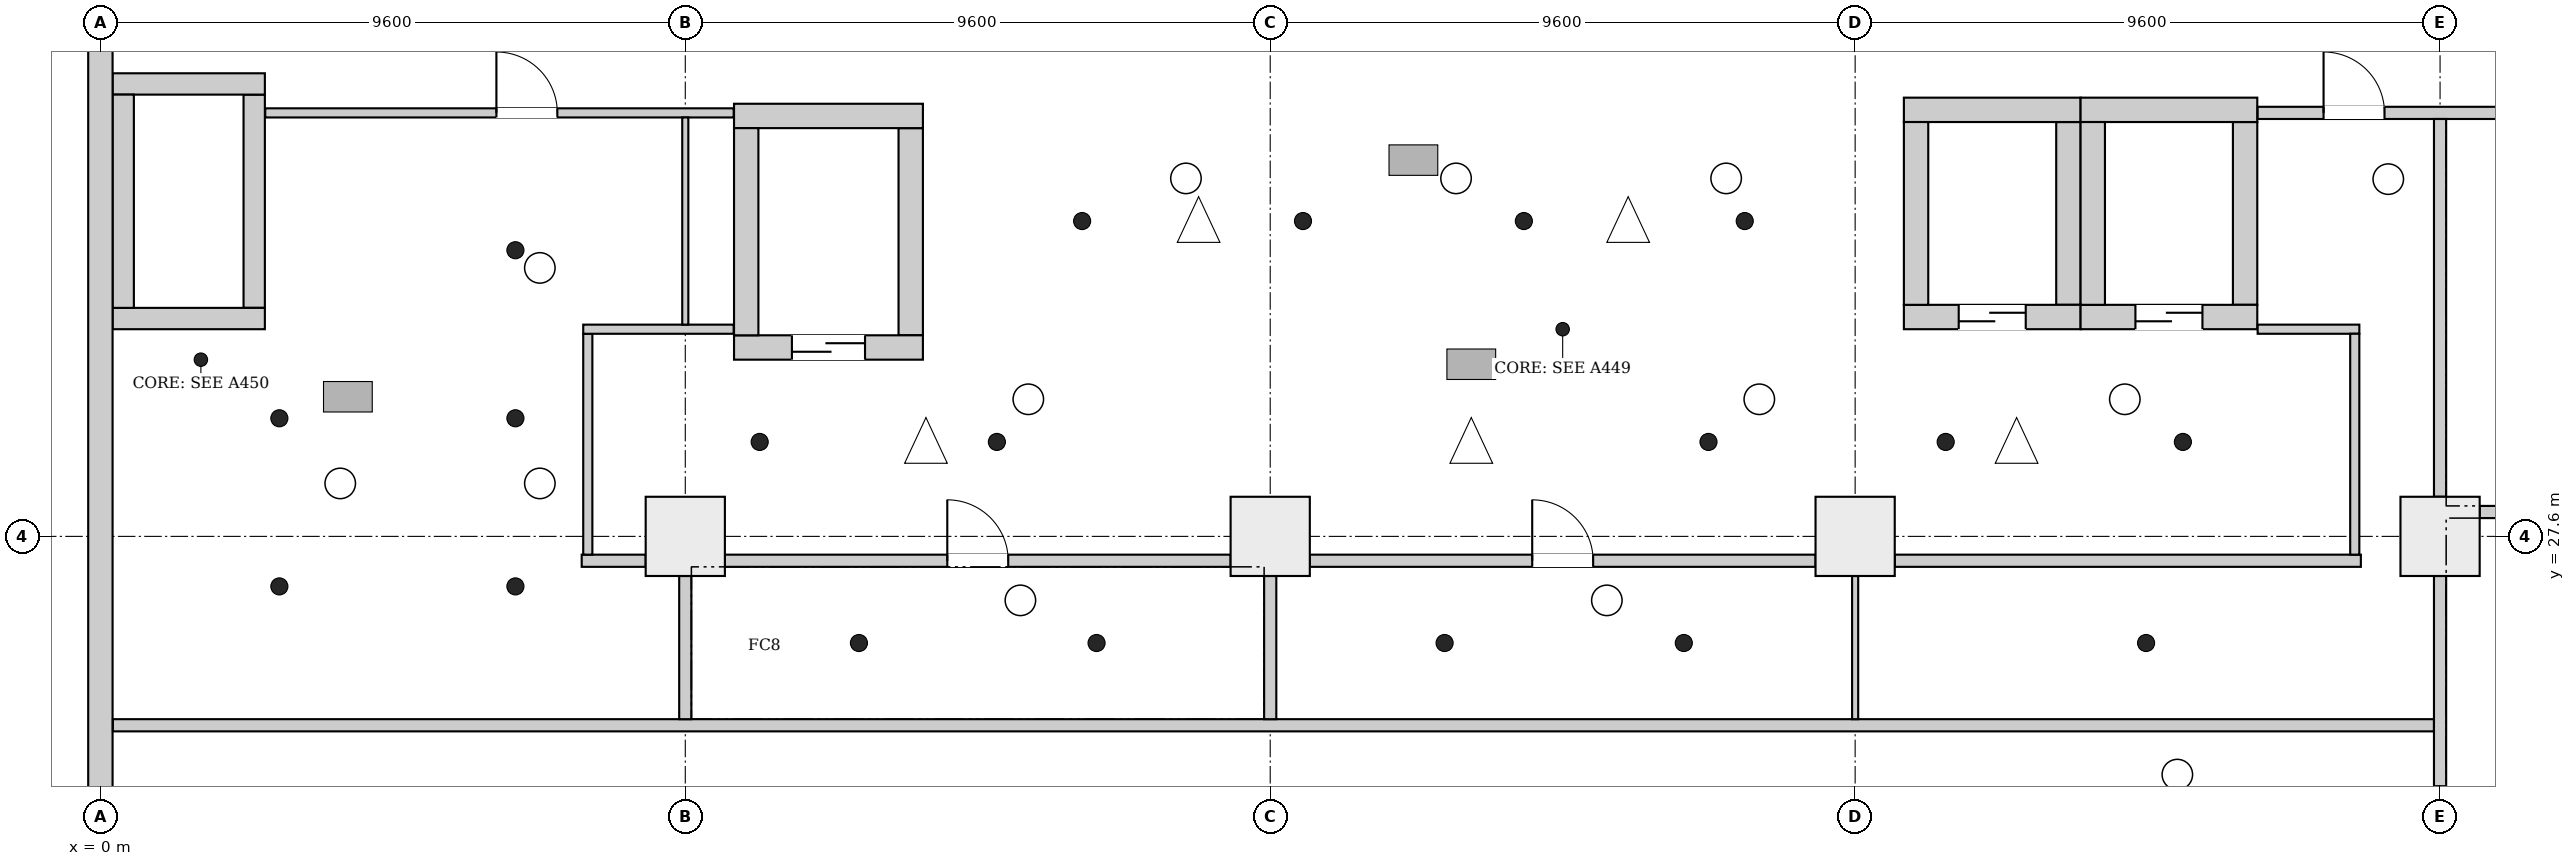
"""IFC4 building model, lengths in metres.
Left out: names, types, materials, properties, quantities, classifications, styles, units other than length and angle.
Written with IfcOpenShell. Run it as: python <this file> out.ifc"""

import sys

from ifc_helpers import new_model, si_unit, direction, frame, frame_2d, origin, origin_2d, place, context, subcontext, project, spatial, rectangle, extrude, element, fill, save


model = new_model("IFC4")
c1 = context("Model", 3, precision=1e-05, world=origin(), true_north=direction((0.0, 1.0)))
c2 = subcontext(c1, "Body", "Model", "MODEL_VIEW")
j1 = project(units=[si_unit("LENGTHUNIT", "METRE"), si_unit("PLANEANGLEUNIT", "RADIAN")], contexts=[c1])
p1 = place(None, origin())
s1 = spatial("IfcSite", under=j1, at=p1, CompositionType="ELEMENT")
p2 = place(p1, origin())
s2 = spatial("IfcBuilding", under=s1, at=p2, CompositionType="ELEMENT")
p3 = place(p2, frame((0.0, 0.0, 6.5)))
s3 = spatial("IfcBuildingStorey", under=s2, at=p3, CompositionType="ELEMENT", Elevation=6.5)
p4 = place(p3, frame((0.0, -0.2, 0.0), z_axis=(0.0, 0.0, 1.0), x_axis=(0.0, 1.0, 0.0)))
e1 = element("IfcWall", 1, at=p4, inside=s3, PredefinedType="SHEAR", context=c2, shape_type="SweptSolid", body=[
    extrude(rectangle(XDim=46.88, YDim=0.4, at=frame_2d((23.44, 0.0))), origin(), (0.0, 0.0, 1.0), 7.7),
])
for number, where, z_axis, x_axis in (
    (2, (0.2, 31.175, 0.0), (0.0, 0.0, 1.0), (1.0, 0.0, 0.0)),
    (3, (0.2, 35.025, 0.0), (0.0, 0.0, 1.0), (1.0, 0.0, 0.0)),
):
    element("IfcWall", number, at=place(p3, frame(where, z_axis=z_axis, x_axis=x_axis)), inside=s3, PredefinedType="SHEAR", context=c2, shape_type="SweptSolid", body=[
        extrude(rectangle(XDim=2.5, YDim=0.35, at=frame_2d((1.25, 0.0))), origin(), (0.0, 0.0, 1.0), 7.7),
    ])
for number, where, z_axis, x_axis in (
    (4, (0.375, 31.35, 0.0), (0.0, 0.0, 1.0), (0.0, 1.0, 0.0)),
    (5, (2.525, 31.35, 0.0), (0.0, 0.0, 1.0), (0.0, 1.0, 0.0)),
):
    element("IfcWall", number, at=place(p3, frame(where, z_axis=z_axis, x_axis=x_axis)), inside=s3, PredefinedType="SHEAR", context=c2, shape_type="SweptSolid", body=[
        extrude(rectangle(XDim=3.5, YDim=0.35, at=frame_2d((1.75, 0.0))), origin(), (0.0, 0.0, 1.0), 7.7),
    ])
p5 = place(p3, frame((10.4, 30.7, 0.0), z_axis=(0.0, 0.0, 1.0), x_axis=(1.0, 0.0, 0.0)))
e6 = element("IfcWall", 6, at=p5, inside=s3, PredefinedType="SHEAR", context=c2, shape_type="SweptSolid", body=[
    extrude(rectangle(XDim=3.1, YDim=0.4, at=frame_2d((1.55, 0.0))), origin(), (0.0, 0.0, 1.0), 7.7),
])
p6 = place(p5, frame((0.95, 0.0, 0.0)))
e7 = element("IfcOpeningElement", 7, at=p6, cuts=e6, PredefinedType="OPENING", context=c2, shape_type="SweptSolid", body=[
    extrude(rectangle(XDim=1.2, YDim=2.1, at=frame_2d((0.6, 1.05))), frame((0.0, 0.21, 0.0), z_axis=(0.0, -1.0, 0.0), x_axis=(1.0, 0.0, 0.0)), (0.0, 0.0, 1.0), 0.42),
])
p7 = place(p3, frame((10.4, 34.5, 0.0), z_axis=(0.0, 0.0, 1.0), x_axis=(1.0, 0.0, 0.0)))
e8 = element("IfcWall", 8, at=p7, inside=s3, PredefinedType="SHEAR", context=c2, shape_type="SweptSolid", body=[
    extrude(rectangle(XDim=3.1, YDim=0.4, at=frame_2d((1.55, 0.0))), origin(), (0.0, 0.0, 1.0), 7.7),
])
for number, where, z_axis, x_axis in (
    (9, (10.6, 30.9, 0.0), (0.0, 0.0, 1.0), (0.0, 1.0, 0.0)),
    (10, (13.3, 30.9, 0.0), (0.0, 0.0, 1.0), (0.0, 1.0, 0.0)),
):
    element("IfcWall", number, at=place(p3, frame(where, z_axis=z_axis, x_axis=x_axis)), inside=s3, PredefinedType="SHEAR", context=c2, shape_type="SweptSolid", body=[
        extrude(rectangle(XDim=3.4, YDim=0.4, at=frame_2d((1.7, 0.0))), origin(), (0.0, 0.0, 1.0), 7.7),
    ])
p8 = place(p3, frame((29.6, 31.2, 0.0), z_axis=(0.0, 0.0, 1.0), x_axis=(1.0, 0.0, 0.0)))
e11 = element("IfcWall", 11, at=p8, inside=s3, PredefinedType="SHEAR", context=c2, shape_type="SweptSolid", body=[
    extrude(rectangle(XDim=2.9, YDim=0.4, at=frame_2d((1.45, 0.0))), origin(), (0.0, 0.0, 1.0), 7.7),
])
p9 = place(p8, frame((0.9, 0.0, 0.0)))
e12 = element("IfcOpeningElement", 12, at=p9, cuts=e11, PredefinedType="OPENING", context=c2, shape_type="SweptSolid", body=[
    extrude(rectangle(XDim=1.1, YDim=2.1, at=frame_2d((0.55, 1.05))), frame((0.0, 0.21, 0.0), z_axis=(0.0, -1.0, 0.0), x_axis=(1.0, 0.0, 0.0)), (0.0, 0.0, 1.0), 0.42),
])
p10 = place(p3, frame((29.6, 34.6, 0.0), z_axis=(0.0, 0.0, 1.0), x_axis=(1.0, 0.0, 0.0)))
e13 = element("IfcWall", 13, at=p10, inside=s3, PredefinedType="SHEAR", context=c2, shape_type="SweptSolid", body=[
    extrude(rectangle(XDim=2.9, YDim=0.4, at=frame_2d((1.45, 0.0))), origin(), (0.0, 0.0, 1.0), 7.7),
])
for number, where, z_axis, x_axis in (
    (14, (29.8, 31.4, 0.0), (0.0, 0.0, 1.0), (0.0, 1.0, 0.0)),
    (15, (32.3, 31.4, 0.0), (0.0, 0.0, 1.0), (0.0, 1.0, 0.0)),
):
    element("IfcWall", number, at=place(p3, frame(where, z_axis=z_axis, x_axis=x_axis)), inside=s3, PredefinedType="SHEAR", context=c2, shape_type="SweptSolid", body=[
        extrude(rectangle(XDim=3.0, YDim=0.4, at=frame_2d((1.5, 0.0))), origin(), (0.0, 0.0, 1.0), 7.7),
    ])
p11 = place(p3, frame((32.5, 31.2, 0.0), z_axis=(0.0, 0.0, 1.0), x_axis=(1.0, 0.0, 0.0)))
e16 = element("IfcWall", 16, at=p11, inside=s3, PredefinedType="SHEAR", context=c2, shape_type="SweptSolid", body=[
    extrude(rectangle(XDim=2.9, YDim=0.4, at=frame_2d((1.45, 0.0))), origin(), (0.0, 0.0, 1.0), 7.7),
])
p12 = place(p11, frame((0.9, 0.0, 0.0)))
e17 = element("IfcOpeningElement", 17, at=p12, cuts=e16, PredefinedType="OPENING", context=c2, shape_type="SweptSolid", body=[
    extrude(rectangle(XDim=1.1, YDim=2.1, at=frame_2d((0.55, 1.05))), frame((0.0, 0.21, 0.0), z_axis=(0.0, -1.0, 0.0), x_axis=(1.0, 0.0, 0.0)), (0.0, 0.0, 1.0), 0.42),
])
p13 = place(p3, frame((32.5, 34.6, 0.0), z_axis=(0.0, 0.0, 1.0), x_axis=(1.0, 0.0, 0.0)))
e18 = element("IfcWall", 18, at=p13, inside=s3, PredefinedType="SHEAR", context=c2, shape_type="SweptSolid", body=[
    extrude(rectangle(XDim=2.9, YDim=0.4, at=frame_2d((1.45, 0.0))), origin(), (0.0, 0.0, 1.0), 7.7),
])
for number, where, z_axis, x_axis in (
    (19, (32.7, 31.4, 0.0), (0.0, 0.0, 1.0), (0.0, 1.0, 0.0)),
    (20, (35.2, 31.4, 0.0), (0.0, 0.0, 1.0), (0.0, 1.0, 0.0)),
):
    element("IfcWall", number, at=place(p3, frame(where, z_axis=z_axis, x_axis=x_axis)), inside=s3, PredefinedType="SHEAR", context=c2, shape_type="SweptSolid", body=[
        extrude(rectangle(XDim=3.0, YDim=0.4, at=frame_2d((1.5, 0.0))), origin(), (0.0, 0.0, 1.0), 7.7),
    ])
for number, where, z_axis, x_axis in (
    (21, (9.6, 27.6, 0.0), (0.0, 0.0, 1.0), (1.0, 0.0, 0.0)),
    (22, (19.2, 27.6, 0.0), (0.0, 0.0, 1.0), (1.0, 0.0, 0.0)),
    (23, (28.8, 27.6, 0.0), (0.0, 0.0, 1.0), (1.0, 0.0, 0.0)),
    (24, (38.4, 27.6, 0.0), (0.0, 0.0, 1.0), (1.0, 0.0, 0.0)),
):
    element("IfcColumn", number, at=place(p3, frame(where, z_axis=z_axis, x_axis=x_axis)), inside=s3, PredefinedType="COLUMN", context=c2, shape_type="SweptSolid", body=[
        extrude(rectangle(XDim=1.3, YDim=1.3, at=origin_2d()), origin(), (0.0, 0.0, 1.0), 7.7),
    ])
p14 = place(p3, frame((0.206, 24.5, 0.0), z_axis=(0.0, 0.0, 1.0), x_axis=(1.0, 0.0, 0.0)))
e25 = element("IfcWall", 25, at=p14, inside=s3, PredefinedType="PARTITIONING", context=c2, shape_type="SweptSolid", body=[
    extrude(rectangle(XDim=38.094, YDim=0.2, at=frame_2d((19.047, 0.0))), origin(), (0.0, 0.0, 1.0), 7.35),
])
p15 = place(p3, frame((2.706, 34.55, 0.0), z_axis=(0.0, 0.0, 1.0), x_axis=(1.0, 0.0, 0.0)))
e26 = element("IfcWall", 26, at=p15, inside=s3, PredefinedType="PARTITIONING", context=c2, shape_type="SweptSolid", body=[
    extrude(rectangle(XDim=7.688, YDim=0.15, at=frame_2d((3.844, 0.0))), origin(), (0.0, 0.0, 1.0), 7.35),
])
p16 = place(p15, frame((3.794, 0.0, 0.0)))
e27 = element("IfcOpeningElement", 27, at=p16, cuts=e26, PredefinedType="OPENING", context=c2, shape_type="SweptSolid", body=[
    extrude(rectangle(XDim=1.0, YDim=2.1, at=frame_2d((0.5, 1.05))), frame((0.0, 0.085, 0.0), z_axis=(0.0, -1.0, 0.0), x_axis=(1.0, 0.0, 0.0)), (0.0, 0.0, 1.0), 0.17),
])
p17 = place(p3, frame((7.9, 27.2, 0.0), z_axis=(0.0, 0.0, 1.0), x_axis=(1.0, 0.0, 0.0)))
e28 = element("IfcWall", 28, at=p17, inside=s3, PredefinedType="PARTITIONING", context=c2, shape_type="SweptSolid", body=[
    extrude(rectangle(XDim=1.05, YDim=0.2, at=frame_2d((0.525, 0.0))), origin(), (0.0, 0.0, 1.0), 7.35),
])
p18 = place(p3, frame((8.0, 27.3, 0.0), z_axis=(0.0, 0.0, 1.0), x_axis=(0.0, 1.0, 0.0)))
e29 = element("IfcWall", 29, at=p18, inside=s3, PredefinedType="PARTITIONING", context=c2, shape_type="SweptSolid", body=[
    extrude(rectangle(XDim=3.625, YDim=0.15, at=frame_2d((1.812, 0.0))), origin(), (0.0, 0.0, 1.0), 7.35),
])
p19 = place(p3, frame((7.925, 31.0, 0.0), z_axis=(0.0, 0.0, 1.0), x_axis=(1.0, 0.0, 0.0)))
e30 = element("IfcWall", 30, at=p19, inside=s3, PredefinedType="PARTITIONING", context=c2, shape_type="SweptSolid", body=[
    extrude(rectangle(XDim=2.469, YDim=0.15, at=frame_2d((1.234, 0.0))), origin(), (0.0, 0.0, 1.0), 7.35),
])
p20 = place(p3, frame((9.6, 24.6, 0.0), z_axis=(0.0, 0.0, 1.0), x_axis=(0.0, 1.0, 0.0)))
e31 = element("IfcWall", 31, at=p20, inside=s3, PredefinedType="PARTITIONING", context=c2, shape_type="SweptSolid", body=[
    extrude(rectangle(XDim=2.35, YDim=0.2, at=frame_2d((1.175, 0.0))), origin(), (0.0, 0.0, 1.0), 6.95),
])
p21 = place(p3, frame((9.6, 31.075, 0.0), z_axis=(0.0, 0.0, 1.0), x_axis=(0.0, 1.0, 0.0)))
e32 = element("IfcWall", 32, at=p21, inside=s3, PredefinedType="PARTITIONING", context=c2, shape_type="SweptSolid", body=[
    extrude(rectangle(XDim=3.4, YDim=0.1, at=frame_2d((1.7, 0.0))), origin(), (0.0, 0.0, 1.0), 6.95),
])
p22 = place(p3, frame((10.25, 27.2, 0.0), z_axis=(0.0, 0.0, 1.0), x_axis=(1.0, 0.0, 0.0)))
e33 = element("IfcWall", 33, at=p22, inside=s3, PredefinedType="PARTITIONING", context=c2, shape_type="SweptSolid", body=[
    extrude(rectangle(XDim=8.3, YDim=0.2, at=frame_2d((4.15, 0.0))), origin(), (0.0, 0.0, 1.0), 7.35),
])
p23 = place(p22, frame((3.65, 0.0, 0.0)))
e34 = element("IfcOpeningElement", 34, at=p23, cuts=e33, PredefinedType="OPENING", context=c2, shape_type="SweptSolid", body=[
    extrude(rectangle(XDim=1.0, YDim=2.1, at=frame_2d((0.5, 1.05))), frame((0.0, 0.11, 0.0), z_axis=(0.0, -1.0, 0.0), x_axis=(1.0, 0.0, 0.0)), (0.0, 0.0, 1.0), 0.22),
])
p24 = place(p3, frame((19.2, 24.6, 0.0), z_axis=(0.0, 0.0, 1.0), x_axis=(0.0, 1.0, 0.0)))
e35 = element("IfcWall", 35, at=p24, inside=s3, PredefinedType="PARTITIONING", context=c2, shape_type="SweptSolid", body=[
    extrude(rectangle(XDim=2.35, YDim=0.2, at=frame_2d((1.175, 0.0))), origin(), (0.0, 0.0, 1.0), 6.95),
])
p25 = place(p3, frame((19.85, 27.2, 0.0), z_axis=(0.0, 0.0, 1.0), x_axis=(1.0, 0.0, 0.0)))
e36 = element("IfcWall", 36, at=p25, inside=s3, PredefinedType="PARTITIONING", context=c2, shape_type="SweptSolid", body=[
    extrude(rectangle(XDim=8.3, YDim=0.2, at=frame_2d((4.15, 0.0))), origin(), (0.0, 0.0, 1.0), 7.35),
])
p26 = place(p25, frame((3.65, 0.0, 0.0)))
e37 = element("IfcOpeningElement", 37, at=p26, cuts=e36, PredefinedType="OPENING", context=c2, shape_type="SweptSolid", body=[
    extrude(rectangle(XDim=1.0, YDim=2.1, at=frame_2d((0.5, 1.05))), frame((0.0, 0.11, 0.0), z_axis=(0.0, -1.0, 0.0), x_axis=(1.0, 0.0, 0.0)), (0.0, 0.0, 1.0), 0.22),
])
p27 = place(p3, frame((28.8, 24.6, 0.0), z_axis=(0.0, 0.0, 1.0), x_axis=(0.0, 1.0, 0.0)))
e38 = element("IfcWall", 38, at=p27, inside=s3, PredefinedType="PARTITIONING", context=c2, shape_type="SweptSolid", body=[
    extrude(rectangle(XDim=2.35, YDim=0.1, at=frame_2d((1.175, 0.0))), origin(), (0.0, 0.0, 1.0), 6.95),
])
p28 = place(p3, frame((29.45, 27.2, 0.0), z_axis=(0.0, 0.0, 1.0), x_axis=(1.0, 0.0, 0.0)))
e39 = element("IfcWall", 39, at=p28, inside=s3, PredefinedType="PARTITIONING", context=c2, shape_type="SweptSolid", body=[
    extrude(rectangle(XDim=7.65, YDim=0.2, at=frame_2d((3.825, 0.0))), origin(), (0.0, 0.0, 1.0), 7.35),
])
p29 = place(p3, frame((35.406, 31.0, 0.0), z_axis=(0.0, 0.0, 1.0), x_axis=(1.0, 0.0, 0.0)))
e40 = element("IfcWall", 40, at=p29, inside=s3, PredefinedType="PARTITIONING", context=c2, shape_type="SweptSolid", body=[
    extrude(rectangle(XDim=1.669, YDim=0.15, at=frame_2d((0.834, 0.0))), origin(), (0.0, 0.0, 1.0), 7.35),
])
p30 = place(p3, frame((35.406, 34.55, 0.0), z_axis=(0.0, 0.0, 1.0), x_axis=(1.0, 0.0, 0.0)))
e41 = element("IfcWall", 41, at=p30, inside=s3, PredefinedType="PARTITIONING", context=c2, shape_type="SweptSolid", body=[
    extrude(rectangle(XDim=19.194, YDim=0.2, at=frame_2d((9.597, 0.0))), origin(), (0.0, 0.0, 1.0), 7.35),
])
p31 = place(p30, frame((1.082, 0.0, 0.0)))
e42 = element("IfcOpeningElement", 42, at=p31, cuts=e41, PredefinedType="OPENING", context=c2, shape_type="SweptSolid", body=[
    extrude(rectangle(XDim=1.0, YDim=2.1, at=frame_2d((0.5, 1.05))), frame((0.0, 0.11, 0.0), z_axis=(0.0, -1.0, 0.0), x_axis=(1.0, 0.0, 0.0)), (0.0, 0.0, 1.0), 0.22),
])
p32 = place(p30, frame((10.509, 0.0, 0.0)))
e43 = element("IfcOpeningElement", 43, at=p32, cuts=e41, PredefinedType="OPENING", context=c2, shape_type="SweptSolid", body=[
    extrude(rectangle(XDim=1.0, YDim=2.1, at=frame_2d((0.5, 1.05))), frame((0.0, 0.11, 0.0), z_axis=(0.0, -1.0, 0.0), x_axis=(1.0, 0.0, 0.0)), (0.0, 0.0, 1.0), 0.22),
])
p33 = place(p3, frame((37.0, 27.3, 0.0), z_axis=(0.0, 0.0, 1.0), x_axis=(0.0, 1.0, 0.0)))
e44 = element("IfcWall", 44, at=p33, inside=s3, PredefinedType="PARTITIONING", context=c2, shape_type="SweptSolid", body=[
    extrude(rectangle(XDim=3.625, YDim=0.15, at=frame_2d((1.812, 0.0))), origin(), (0.0, 0.0, 1.0), 7.35),
])
p34 = place(p3, frame((38.4, 19.05, 0.0), z_axis=(0.0, 0.0, 1.0), x_axis=(0.0, 1.0, 0.0)))
e45 = element("IfcWall", 45, at=p34, inside=s3, PredefinedType="PARTITIONING", context=c2, shape_type="SweptSolid", body=[
    extrude(rectangle(XDim=7.9, YDim=0.2, at=frame_2d((3.95, 0.0))), origin(), (0.0, 0.0, 1.0), 6.95),
])
p35 = place(p34, frame((3.45, 0.0, 0.0)))
e46 = element("IfcOpeningElement", 46, at=p35, cuts=e45, PredefinedType="OPENING", context=c2, shape_type="SweptSolid", body=[
    extrude(rectangle(XDim=1.0, YDim=2.1, at=frame_2d((0.5, 1.05))), frame((0.0, 0.11, 0.0), z_axis=(0.0, -1.0, 0.0), x_axis=(1.0, 0.0, 0.0)), (0.0, 0.0, 1.0), 0.22),
])
p36 = place(p3, frame((38.4, 28.25, 0.0), z_axis=(0.0, 0.0, 1.0), x_axis=(0.0, 1.0, 0.0)))
e47 = element("IfcWall", 47, at=p36, inside=s3, PredefinedType="PARTITIONING", context=c2, shape_type="SweptSolid", body=[
    extrude(rectangle(XDim=6.2, YDim=0.2, at=frame_2d((3.1, 0.0))), origin(), (0.0, 0.0, 1.0), 6.95),
])
p37 = place(p3, frame((39.05, 28.0, 0.0), z_axis=(0.0, 0.0, 1.0), x_axis=(1.0, 0.0, 0.0)))
e48 = element("IfcWall", 48, at=p37, inside=s3, PredefinedType="PARTITIONING", context=c2, shape_type="SweptSolid", body=[
    extrude(rectangle(XDim=8.3, YDim=0.2, at=frame_2d((4.15, 0.0))), origin(), (0.0, 0.0, 1.0), 7.35),
])
p38 = place(p6, origin())
e49 = element("IfcDoor", 49, at=p38, inside=s3, OperationType="DOUBLE_DOOR_SLIDING", PredefinedType="DOOR", context=c2, shape_type="SweptSolid", body=[
    extrude(rectangle(XDim=1.2, YDim=2.1, at=frame_2d((0.6, 1.05))), frame((0.0, 0.025, 0.0), z_axis=(0.0, -1.0, 0.0), x_axis=(1.0, 0.0, 0.0)), (0.0, 0.0, 1.0), 0.05),
])
fill(e7, e49)
p39 = place(p9, origin())
e50 = element("IfcDoor", 50, at=p39, inside=s3, OperationType="DOUBLE_DOOR_SLIDING", PredefinedType="DOOR", context=c2, shape_type="SweptSolid", body=[
    extrude(rectangle(XDim=1.1, YDim=2.1, at=frame_2d((0.55, 1.05))), frame((0.0, 0.025, 0.0), z_axis=(0.0, -1.0, 0.0), x_axis=(1.0, 0.0, 0.0)), (0.0, 0.0, 1.0), 0.05),
])
fill(e12, e50)
p40 = place(p12, origin())
e51 = element("IfcDoor", 51, at=p40, inside=s3, OperationType="DOUBLE_DOOR_SLIDING", PredefinedType="DOOR", context=c2, shape_type="SweptSolid", body=[
    extrude(rectangle(XDim=1.1, YDim=2.1, at=frame_2d((0.55, 1.05))), frame((0.0, 0.025, 0.0), z_axis=(0.0, -1.0, 0.0), x_axis=(1.0, 0.0, 0.0)), (0.0, 0.0, 1.0), 0.05),
])
fill(e17, e51)
p41 = place(p16, origin())
e52 = element("IfcDoor", 52, at=p41, inside=s3, OperationType="SINGLE_SWING_LEFT", PredefinedType="DOOR", context=c2, shape_type="SweptSolid", body=[
    extrude(rectangle(XDim=1.0, YDim=2.1, at=frame_2d((0.5, 1.05))), frame((0.0, 0.025, 0.0), z_axis=(0.0, -1.0, 0.0), x_axis=(1.0, 0.0, 0.0)), (0.0, 0.0, 1.0), 0.05),
])
fill(e27, e52)
p42 = place(p23, origin())
e53 = element("IfcDoor", 53, at=p42, inside=s3, OperationType="SINGLE_SWING_RIGHT", PredefinedType="DOOR", context=c2, shape_type="SweptSolid", body=[
    extrude(rectangle(XDim=1.0, YDim=2.1, at=frame_2d((0.5, 1.05))), frame((0.0, 0.025, 0.0), z_axis=(0.0, -1.0, 0.0), x_axis=(1.0, 0.0, 0.0)), (0.0, 0.0, 1.0), 0.05),
])
fill(e34, e53)
p43 = place(p26, origin())
e54 = element("IfcDoor", 54, at=p43, inside=s3, OperationType="SINGLE_SWING_RIGHT", PredefinedType="DOOR", context=c2, shape_type="SweptSolid", body=[
    extrude(rectangle(XDim=1.0, YDim=2.1, at=frame_2d((0.5, 1.05))), frame((0.0, 0.025, 0.0), z_axis=(0.0, -1.0, 0.0), x_axis=(1.0, 0.0, 0.0)), (0.0, 0.0, 1.0), 0.05),
])
fill(e37, e54)
p44 = place(p31, origin())
e55 = element("IfcDoor", 55, at=p44, inside=s3, OperationType="SINGLE_SWING_RIGHT", PredefinedType="DOOR", context=c2, shape_type="SweptSolid", body=[
    extrude(rectangle(XDim=1.0, YDim=2.1, at=frame_2d((0.5, 1.05))), frame((0.0, 0.025, 0.0), z_axis=(0.0, -1.0, 0.0), x_axis=(1.0, 0.0, 0.0)), (0.0, 0.0, 1.0), 0.05),
])
fill(e42, e55)
save(model, sys.argv[1])
